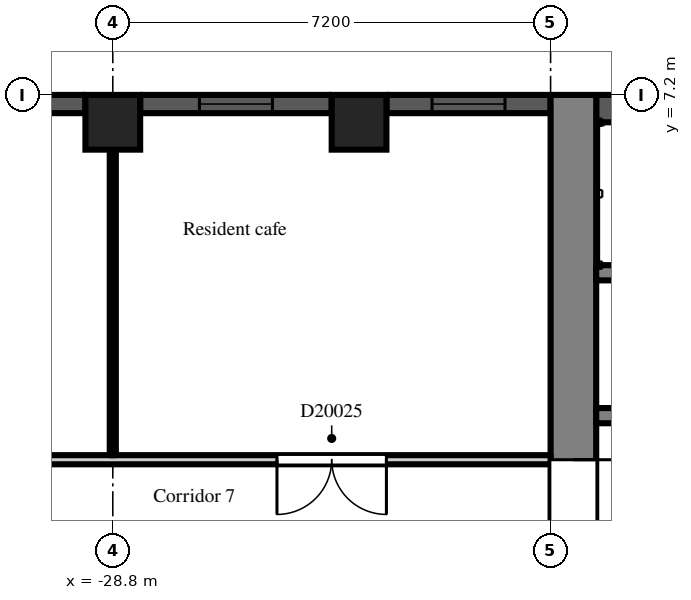
"""IFC4 building model, lengths in metres.
Left out: names, types, materials, properties, quantities, classifications, styles, units other than length and angle.
Written with IfcOpenShell. Run it as: python <this file> out.ifc"""

import sys

from ifc_helpers import new_model, si_unit, direction, frame, frame_2d, origin, origin_2d, place, context, subcontext, project, spatial, rectangle, extrude, element, fill, save


model = new_model("IFC4")
c1 = context("Model", 3, precision=1e-05, world=origin(), true_north=direction((0.0, 1.0)))
c2 = subcontext(c1, "Body", "Model", "MODEL_VIEW")
j1 = project(units=[si_unit("LENGTHUNIT", "METRE"), si_unit("PLANEANGLEUNIT", "RADIAN")], contexts=[c1])
p1 = place(None, origin())
s1 = spatial("IfcSite", under=j1, at=p1, CompositionType="ELEMENT")
p2 = place(p1, origin())
s2 = spatial("IfcBuilding", under=s1, at=p2, CompositionType="ELEMENT")
p3 = place(p2, frame((0.0, 0.0, 138.3)))
s3 = spatial("IfcBuildingStorey", under=s2, at=p3, CompositionType="ELEMENT", Elevation=138.3)
for number, where, z_axis, x_axis in (
    (1, (-28.8, 6.75, 0.0), (0.0, 0.0, 1.0), (1.0, 0.0, 0.0)),
    (2, (-24.75, 6.75, 0.0), (0.0, 0.0, 1.0), (1.0, 0.0, 0.0)),
):
    element("IfcColumn", number, at=place(p3, frame(where, z_axis=z_axis, x_axis=x_axis)), inside=s3, PredefinedType="COLUMN", context=c2, shape_type="SweptSolid", body=[
        extrude(rectangle(XDim=0.9, YDim=0.9, at=origin_2d()), origin(), (0.0, 0.0, 1.0), 3.0),
    ])
p4 = place(p3, frame((-21.6, 7.05, 0.0), z_axis=(0.0, 0.0, 1.0), x_axis=(-1.0, 0.0, 0.0)))
e3 = element("IfcWall", 3, at=p4, inside=s3, PredefinedType="SOLIDWALL", context=c2, shape_type="SweptSolid", body=[
    extrude(rectangle(XDim=2.7, YDim=0.3, at=frame_2d((1.35, 0.0))), origin(), (0.0, 0.0, 1.0), 2.2),
])
p5 = place(p4, frame((0.75, 0.0, 0.2)))
e4 = element("IfcOpeningElement", 4, at=p5, cuts=e3, PredefinedType="OPENING", context=c2, shape_type="SweptSolid", body=[
    extrude(rectangle(XDim=1.2, YDim=1.85, at=frame_2d((0.6, 0.925))), frame((0.0, 0.16, 0.0), z_axis=(0.0, -1.0, 0.0), x_axis=(1.0, 0.0, 0.0)), (0.0, 0.0, 1.0), 0.32),
])
p6 = place(p3, frame((-25.2, 7.05, 0.0), z_axis=(0.0, 0.0, 1.0), x_axis=(-1.0, 0.0, 0.0)))
e5 = element("IfcWall", 5, at=p6, inside=s3, PredefinedType="SOLIDWALL", context=c2, shape_type="SweptSolid", body=[
    extrude(rectangle(XDim=3.15, YDim=0.3, at=frame_2d((1.575, 0.0))), origin(), (0.0, 0.0, 1.0), 2.2),
])
p7 = place(p6, frame((0.975, 0.0, 0.2)))
e6 = element("IfcOpeningElement", 6, at=p7, cuts=e5, PredefinedType="OPENING", context=c2, shape_type="SweptSolid", body=[
    extrude(rectangle(XDim=1.2, YDim=1.85, at=frame_2d((0.6, 0.925))), frame((0.0, 0.16, 0.0), z_axis=(0.0, -1.0, 0.0), x_axis=(1.0, 0.0, 0.0)), (0.0, 0.0, 1.0), 0.32),
])
p8 = place(p3, frame((-29.25, 7.05, 0.0), z_axis=(0.0, 0.0, 1.0), x_axis=(-1.0, 0.0, 0.0)))
e7 = element("IfcWall", 7, at=p8, inside=s3, PredefinedType="SOLIDWALL", context=c2, shape_type="SweptSolid", body=[
    extrude(rectangle(XDim=6.3, YDim=0.3, at=frame_2d((3.15, 0.0))), origin(), (0.0, 0.0, 1.0), 2.2),
])
p9 = place(p8, frame((0.975, 0.0, 0.2)))
e8 = element("IfcOpeningElement", 8, at=p9, cuts=e7, PredefinedType="OPENING", context=c2, shape_type="SweptSolid", body=[
    extrude(rectangle(XDim=1.2, YDim=1.85, at=frame_2d((0.6, 0.925))), frame((0.0, 0.16, 0.0), z_axis=(0.0, -1.0, 0.0), x_axis=(1.0, 0.0, 0.0)), (0.0, 0.0, 1.0), 0.32),
])
p10 = place(p3, frame((-21.225, -7.2, 0.0), z_axis=(0.0, 0.0, 1.0), x_axis=(0.0, 1.0, 0.0)))
e9 = element("IfcWall", 9, at=p10, inside=s3, PredefinedType="SHEAR", context=c2, shape_type="SweptSolid", body=[
    extrude(rectangle(XDim=14.4, YDim=0.75, at=frame_2d((7.2, 0.0))), origin(), (0.0, 0.0, 1.0), 2.6),
])
p11 = place(p10, frame((6.0, 0.0, 0.0)))
e10 = element("IfcOpeningElement", 10, at=p11, cuts=e9, PredefinedType="OPENING", context=c2, shape_type="SweptSolid", body=[
    extrude(rectangle(XDim=2.4, YDim=2.2, at=frame_2d((1.2, 1.1))), frame((0.0, 0.385, 0.0), z_axis=(0.0, -1.0, 0.0), x_axis=(1.0, 0.0, 0.0)), (0.0, 0.0, 1.0), 0.77),
])
p12 = place(p3, frame((-7.9, 6.975, 0.0), z_axis=(0.0, 0.0, 1.0), x_axis=(-1.0, 0.0, 0.0)))
e11 = element("IfcWall", 11, at=p12, inside=s3, PredefinedType="SHEAR", context=c2, shape_type="SweptSolid", body=[
    extrude(rectangle(XDim=12.95, YDim=0.45, at=frame_2d((6.475, 0.0))), origin(), (0.0, 0.0, 1.0), 2.6),
])
p13 = place(p3, frame((-7.9, 1.925, 0.0), z_axis=(0.0, 0.0, 1.0), x_axis=(-1.0, 0.0, 0.0)))
e12 = element("IfcWall", 12, at=p13, inside=s3, PredefinedType="SHEAR", context=c2, shape_type="SweptSolid", body=[
    extrude(rectangle(XDim=12.95, YDim=0.25, at=frame_2d((6.475, 0.0))), origin(), (0.0, 0.0, 1.0), 2.6),
])
p14 = place(p13, frame((4.825, 0.0, 0.0)))
e13 = element("IfcOpeningElement", 13, at=p14, cuts=e12, PredefinedType="OPENING", context=c2, shape_type="SweptSolid", body=[
    extrude(rectangle(XDim=1.1, YDim=2.1, at=frame_2d((0.55, 1.05))), frame((0.0, 0.135, 0.0), z_axis=(0.0, -1.0, 0.0), x_axis=(1.0, 0.0, 0.0)), (0.0, 0.0, 1.0), 0.27),
])
p15 = place(p13, frame((7.025, 0.0, 0.0)))
e14 = element("IfcOpeningElement", 14, at=p15, cuts=e12, PredefinedType="OPENING", context=c2, shape_type="SweptSolid", body=[
    extrude(rectangle(XDim=1.1, YDim=2.1, at=frame_2d((0.55, 1.05))), frame((0.0, 0.135, 0.0), z_axis=(0.0, -1.0, 0.0), x_axis=(1.0, 0.0, 0.0)), (0.0, 0.0, 1.0), 0.27),
])
p16 = place(p13, frame((9.225, 0.0, 0.0)))
e15 = element("IfcOpeningElement", 15, at=p16, cuts=e12, PredefinedType="OPENING", context=c2, shape_type="SweptSolid", body=[
    extrude(rectangle(XDim=1.1, YDim=2.1, at=frame_2d((0.55, 1.05))), frame((0.0, 0.135, 0.0), z_axis=(0.0, -1.0, 0.0), x_axis=(1.0, 0.0, 0.0)), (0.0, 0.0, 1.0), 0.27),
])
p17 = place(p13, frame((0.525, 0.0, 0.0)))
e16 = element("IfcOpeningElement", 16, at=p17, cuts=e12, PredefinedType="OPENING", context=c2, shape_type="SweptSolid", body=[
    extrude(rectangle(XDim=0.9, YDim=2.1, at=frame_2d((0.45, 1.05))), frame((0.0, 0.135, 0.0), z_axis=(0.0, -1.0, 0.0), x_axis=(1.0, 0.0, 0.0)), (0.0, 0.0, 1.0), 0.27),
])
p18 = place(p13, frame((2.625, 0.0, 0.0)))
e17 = element("IfcOpeningElement", 17, at=p18, cuts=e12, PredefinedType="OPENING", context=c2, shape_type="SweptSolid", body=[
    extrude(rectangle(XDim=1.1, YDim=2.1, at=frame_2d((0.55, 1.05))), frame((0.0, 0.135, 0.0), z_axis=(0.0, -1.0, 0.0), x_axis=(1.0, 0.0, 0.0)), (0.0, 0.0, 1.0), 0.27),
])
p19 = place(p13, frame((11.525, 0.0, 0.0)))
e18 = element("IfcOpeningElement", 18, at=p19, cuts=e12, PredefinedType="OPENING", context=c2, shape_type="SweptSolid", body=[
    extrude(rectangle(XDim=0.9, YDim=2.1, at=frame_2d((0.45, 1.05))), frame((0.0, 0.135, 0.0), z_axis=(0.0, -1.0, 0.0), x_axis=(1.0, 0.0, 0.0)), (0.0, 0.0, 1.0), 0.27),
])
p20 = place(p3, frame((-12.3, 4.275, 0.0), z_axis=(0.0, 0.0, 1.0), x_axis=(-1.0, 0.0, 0.0)))
e19 = element("IfcWall", 19, at=p20, inside=s3, PredefinedType="SHEAR", context=c2, shape_type="SweptSolid", body=[
    extrude(rectangle(XDim=8.55, YDim=0.25, at=frame_2d((4.275, 0.0))), origin(), (0.0, 0.0, 1.0), 2.6),
])
p21 = place(p3, frame((-36.5, 1.2, 0.0), z_axis=(0.0, 0.0, 1.0), x_axis=(1.0, 0.0, 0.0)))
e20 = element("IfcWall", 20, at=p21, inside=s3, PredefinedType="PARTITIONING", context=c2, shape_type="SweptSolid", body=[
    extrude(rectangle(XDim=14.9, YDim=0.15, at=frame_2d((7.45, 0.0))), origin(), (0.0, 0.0, 1.0), 2.6),
])
p22 = place(p21, frame((10.4, 0.0, 0.0)))
e21 = element("IfcOpeningElement", 21, at=p22, cuts=e20, PredefinedType="OPENING", context=c2, shape_type="SweptSolid", body=[
    extrude(rectangle(XDim=1.8, YDim=2.1, at=frame_2d((0.9, 1.05))), frame((0.0, 0.085, 0.0), z_axis=(0.0, -1.0, 0.0), x_axis=(1.0, 0.0, 0.0)), (0.0, 0.0, 1.0), 0.17),
])
p23 = place(p21, frame((5.45, 0.0, 0.0)))
e22 = element("IfcOpeningElement", 22, at=p23, cuts=e20, PredefinedType="OPENING", context=c2, shape_type="SweptSolid", body=[
    extrude(rectangle(XDim=0.9, YDim=2.1, at=frame_2d((0.45, 1.05))), frame((0.0, 0.085, 0.0), z_axis=(0.0, -1.0, 0.0), x_axis=(1.0, 0.0, 0.0)), (0.0, 0.0, 1.0), 0.17),
])
p24 = place(p21, frame((1.15, 0.0, 0.0)))
e23 = element("IfcOpeningElement", 23, at=p24, cuts=e20, PredefinedType="OPENING", context=c2, shape_type="SweptSolid", body=[
    extrude(rectangle(XDim=1.8, YDim=2.1, at=frame_2d((0.9, 1.05))), frame((0.0, 0.085, 0.0), z_axis=(0.0, -1.0, 0.0), x_axis=(1.0, 0.0, 0.0)), (0.0, 0.0, 1.0), 0.17),
])
p25 = place(p3, frame((-28.8, 1.275, 0.0), z_axis=(0.0, 0.0, 1.0), x_axis=(0.0, 1.0, 0.0)))
e24 = element("IfcWall", 24, at=p25, inside=s3, PredefinedType="PARTITIONING", context=c2, shape_type="SweptSolid", body=[
    extrude(rectangle(XDim=5.625, YDim=0.1, at=frame_2d((2.812, 0.0))), origin(), (0.0, 0.0, 1.0), 2.6),
])
p26 = place(p5, origin())
e25 = element("IfcWindow", 25, at=p26, inside=s3, PartitioningType="SINGLE_PANEL", PredefinedType="WINDOW", context=c2, shape_type="SweptSolid", body=[
    extrude(rectangle(XDim=1.2, YDim=1.85, at=frame_2d((0.6, 0.925))), frame((0.0, 0.03, 0.0), z_axis=(0.0, -1.0, 0.0), x_axis=(1.0, 0.0, 0.0)), (0.0, 0.0, 1.0), 0.06),
])
fill(e4, e25)
p27 = place(p7, origin())
e26 = element("IfcWindow", 26, at=p27, inside=s3, PartitioningType="SINGLE_PANEL", PredefinedType="WINDOW", context=c2, shape_type="SweptSolid", body=[
    extrude(rectangle(XDim=1.2, YDim=1.85, at=frame_2d((0.6, 0.925))), frame((0.0, 0.03, 0.0), z_axis=(0.0, -1.0, 0.0), x_axis=(1.0, 0.0, 0.0)), (0.0, 0.0, 1.0), 0.06),
])
fill(e6, e26)
p28 = place(p11, frame((2.4, 0.0, 0.0), z_axis=(0.0, 0.0, 1.0), x_axis=(-1.0, 0.0, 0.0)))
e27 = element("IfcDoor", 27, at=p28, inside=s3, OperationType="DOUBLE_DOOR_DOUBLE_SWING", PredefinedType="DOOR", context=c2, shape_type="SweptSolid", body=[
    extrude(rectangle(XDim=2.4, YDim=2.2, at=frame_2d((1.2, 1.1))), frame((0.0, 0.025, 0.0), z_axis=(0.0, -1.0, 0.0), x_axis=(1.0, 0.0, 0.0)), (0.0, 0.0, 1.0), 0.05),
])
fill(e10, e27)
p29 = place(p22, frame((1.8, 0.0, 0.0), z_axis=(0.0, 0.0, 1.0), x_axis=(-1.0, 0.0, 0.0)))
e28 = element("IfcDoor", 28, at=p29, inside=s3, OperationType="DOUBLE_DOOR_DOUBLE_SWING", PredefinedType="DOOR", context=c2, shape_type="SweptSolid", body=[
    extrude(rectangle(XDim=1.8, YDim=2.1, at=frame_2d((0.9, 1.05))), frame((0.0, 0.025, 0.0), z_axis=(0.0, -1.0, 0.0), x_axis=(1.0, 0.0, 0.0)), (0.0, 0.0, 1.0), 0.05),
])
fill(e21, e28)
save(model, sys.argv[1])
